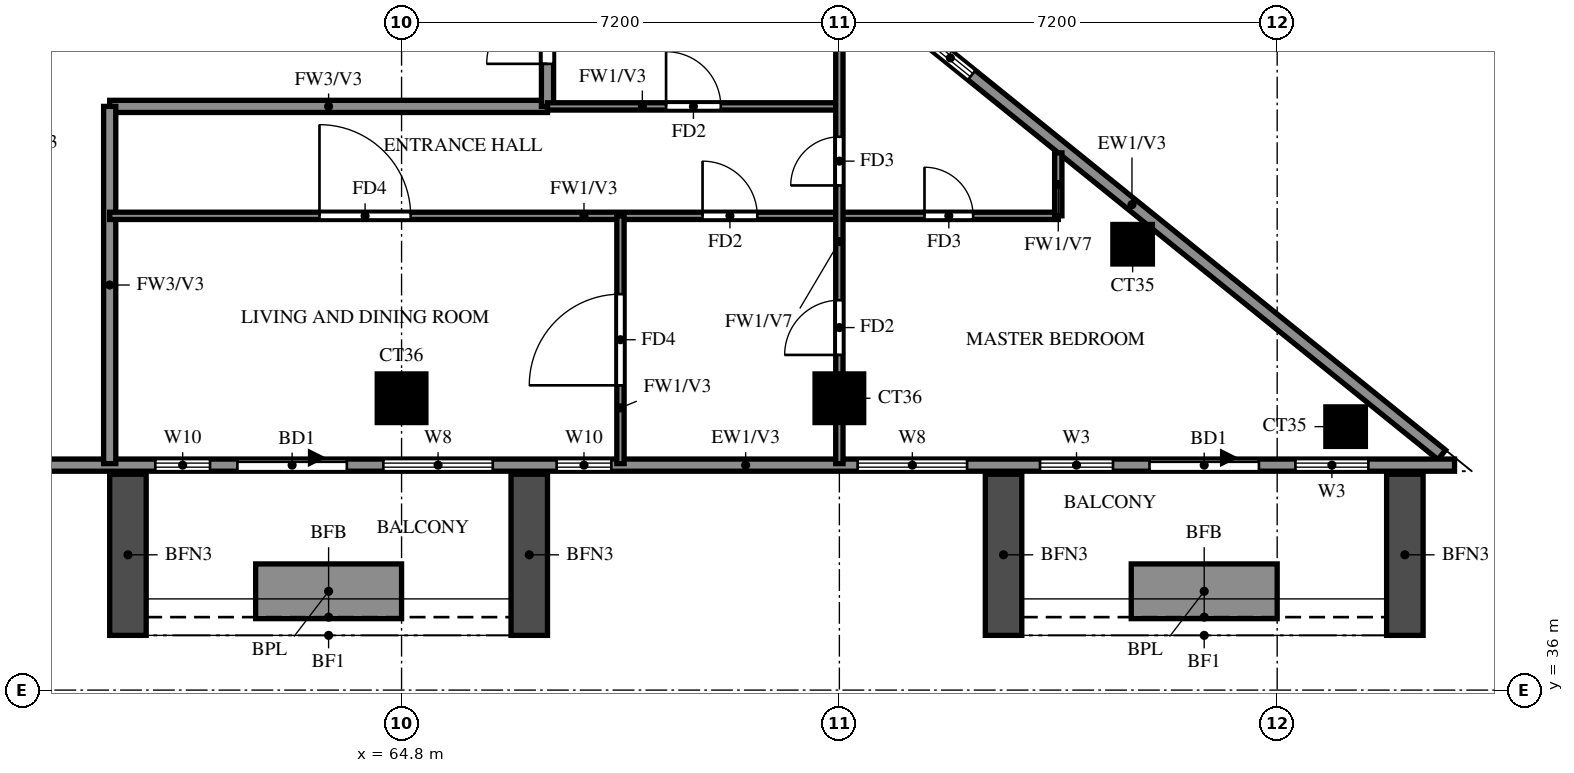
"""IFC4 building model, lengths in metres.
Left out: names, types, materials, properties, quantities, classifications, styles, units other than length and angle.
Written with IfcOpenShell. Run it as: python <this file> out.ifc"""

import sys

from ifc_helpers import new_model, si_unit, direction, frame, frame_2d, origin, origin_2d, place, context, subcontext, project, spatial, rectangle, extrude, source, transform, mapped, element, fill, save


model = new_model("IFC4")
c1 = context("Model", 3, precision=1e-05, world=origin(), true_north=direction((0.0, 1.0)))
c2 = subcontext(c1, "Body", "Model", "MODEL_VIEW")
j1 = project(units=[si_unit("LENGTHUNIT", "METRE"), si_unit("PLANEANGLEUNIT", "RADIAN")], contexts=[c1])
p1 = place(None, origin())
s1 = spatial("IfcSite", under=j1, at=p1, CompositionType="ELEMENT")
p2 = place(p1, origin())
s2 = spatial("IfcBuilding", under=s1, at=p2, CompositionType="ELEMENT")
p3 = place(p2, frame((0.0, 0.0, 246.5)))
s3 = spatial("IfcBuildingStorey", under=s2, at=p3, CompositionType="ELEMENT", Elevation=246.5)
m1 = source(origin(), c2, "Body", "SweptSolid", [
    extrude(rectangle(XDim=0.65, YDim=0.65, at=origin_2d()), origin(), (0.0, 0.0, 1.0), 3.22),
])
p4 = place(p3, frame((80.326, 40.333, 0.0), z_axis=(0.0, 0.0, 1.0), x_axis=(1.0, 0.0, 0.0)))
e1 = element("IfcColumn", 1, at=p4, inside=s3, PredefinedType="COLUMN", context=c2, shape_type="MappedRepresentation", body=[
    mapped(m1, transform((0.0, 0.0, 0.0))),
])
m2 = source(origin(), c2, "Body", "SweptSolid", [
    extrude(rectangle(XDim=0.8, YDim=0.8, at=origin_2d()), origin(), (0.0, 0.0, 1.0), 3.22),
])
for number, where, z_axis, x_axis in (
    (2, (64.8, 40.8, 0.0), (0.0, 0.0, 1.0), (1.0, 0.0, 0.0)),
    (3, (72.0, 40.8, 0.0), (0.0, 0.0, 1.0), (1.0, 0.0, 0.0)),
):
    element("IfcColumn", number, at=place(p3, frame(where, z_axis=z_axis, x_axis=x_axis)), inside=s3, PredefinedType="COLUMN", context=c2, shape_type="MappedRepresentation", body=[
        mapped(m2, transform((0.0, 0.0, 0.0))),
    ])
p5 = place(p3, frame((76.823, 43.333, 0.0), z_axis=(0.0, 0.0, 1.0), x_axis=(1.0, 0.0, 0.0)))
e4 = element("IfcColumn", 4, at=p5, inside=s3, PredefinedType="COLUMN", context=c2, shape_type="MappedRepresentation", body=[
    mapped(m1, transform((0.0, 0.0, 0.0))),
])
p6 = place(p3, frame((81.907, 39.87, 0.0), z_axis=(0.0, 0.0, 1.0), x_axis=(-0.777936274417, 0.62834318087, 0.0)))
e5 = element("IfcWall", 5, at=p6, inside=s3, PredefinedType="SOLIDWALL", context=c2, shape_type="SweptSolid", body=[
    extrude(rectangle(XDim=13.099, YDim=0.2, at=frame_2d((6.549, 0.0))), origin(), (0.0, 0.0, 1.0), 3.22),
])
p7 = place(p6, frame((9.938, 0.0, 1.5)))
e6 = element("IfcOpeningElement", 6, at=p7, cuts=e5, PredefinedType="OPENING", context=c2, shape_type="SweptSolid", body=[
    extrude(rectangle(XDim=0.9, YDim=0.9, at=frame_2d((0.45, 0.45))), frame((0.0, 0.11, 0.0), z_axis=(0.0, -1.0, 0.0), x_axis=(1.0, 0.0, 0.0)), (0.0, 0.0, 1.0), 0.22),
])
p8 = place(p3, frame((58.8, 39.7, 0.0), z_axis=(0.0, 0.0, 1.0), x_axis=(1.0, 0.0, 0.0)))
e7 = element("IfcWall", 7, at=p8, inside=s3, PredefinedType="SOLIDWALL", context=c2, shape_type="SweptSolid", body=[
    extrude(rectangle(XDim=23.317, YDim=0.2, at=frame_2d((11.658, 0.0))), origin(), (0.0, 0.0, 1.0), 3.22),
])
p9 = place(p8, frame((3.3, 0.0, 0.0)))
e8 = element("IfcOpeningElement", 8, at=p9, cuts=e7, PredefinedType="OPENING", context=c2, shape_type="SweptSolid", body=[
    extrude(rectangle(XDim=1.8, YDim=2.4, at=frame_2d((0.9, 1.2))), frame((0.0, 0.11, 0.0), z_axis=(0.0, -1.0, 0.0), x_axis=(1.0, 0.0, 0.0)), (0.0, 0.0, 1.0), 0.22),
])
p10 = place(p8, frame((18.3, 0.0, 0.0)))
e9 = element("IfcOpeningElement", 9, at=p10, cuts=e7, PredefinedType="OPENING", context=c2, shape_type="SweptSolid", body=[
    extrude(rectangle(XDim=1.8, YDim=2.4, at=frame_2d((0.9, 1.2))), frame((0.0, 0.11, 0.0), z_axis=(0.0, -1.0, 0.0), x_axis=(1.0, 0.0, 0.0)), (0.0, 0.0, 1.0), 0.22),
])
p11 = place(p8, frame((1.95, 0.0, 0.6)))
e10 = element("IfcOpeningElement", 10, at=p11, cuts=e7, PredefinedType="OPENING", context=c2, shape_type="SweptSolid", body=[
    extrude(rectangle(XDim=0.9, YDim=2.4, at=frame_2d((0.45, 1.2))), frame((0.0, 0.11, 0.0), z_axis=(0.0, -1.0, 0.0), x_axis=(1.0, 0.0, 0.0)), (0.0, 0.0, 1.0), 0.22),
])
p12 = place(p8, frame((5.7, 0.0, 0.6)))
e11 = element("IfcOpeningElement", 11, at=p12, cuts=e7, PredefinedType="OPENING", context=c2, shape_type="SweptSolid", body=[
    extrude(rectangle(XDim=1.8, YDim=2.4, at=frame_2d((0.9, 1.2))), frame((0.0, 0.11, 0.0), z_axis=(0.0, -1.0, 0.0), x_axis=(1.0, 0.0, 0.0)), (0.0, 0.0, 1.0), 0.22),
])
p13 = place(p8, frame((8.55, 0.0, 0.6)))
e12 = element("IfcOpeningElement", 12, at=p13, cuts=e7, PredefinedType="OPENING", context=c2, shape_type="SweptSolid", body=[
    extrude(rectangle(XDim=0.9, YDim=2.4, at=frame_2d((0.45, 1.2))), frame((0.0, 0.11, 0.0), z_axis=(0.0, -1.0, 0.0), x_axis=(1.0, 0.0, 0.0)), (0.0, 0.0, 1.0), 0.22),
])
p14 = place(p8, frame((13.5, 0.0, 0.6)))
e13 = element("IfcOpeningElement", 13, at=p14, cuts=e7, PredefinedType="OPENING", context=c2, shape_type="SweptSolid", body=[
    extrude(rectangle(XDim=1.8, YDim=2.4, at=frame_2d((0.9, 1.2))), frame((0.0, 0.11, 0.0), z_axis=(0.0, -1.0, 0.0), x_axis=(1.0, 0.0, 0.0)), (0.0, 0.0, 1.0), 0.22),
])
p15 = place(p8, frame((16.5, 0.0, 0.6)))
e14 = element("IfcOpeningElement", 14, at=p15, cuts=e7, PredefinedType="OPENING", context=c2, shape_type="SweptSolid", body=[
    extrude(rectangle(XDim=1.2, YDim=2.4, at=frame_2d((0.6, 1.2))), frame((0.0, 0.11, 0.0), z_axis=(0.0, -1.0, 0.0), x_axis=(1.0, 0.0, 0.0)), (0.0, 0.0, 1.0), 0.22),
])
p16 = place(p8, frame((20.7, 0.0, 0.6)))
e15 = element("IfcOpeningElement", 15, at=p16, cuts=e7, PredefinedType="OPENING", context=c2, shape_type="SweptSolid", body=[
    extrude(rectangle(XDim=1.2, YDim=2.4, at=frame_2d((0.6, 1.2))), frame((0.0, 0.11, 0.0), z_axis=(0.0, -1.0, 0.0), x_axis=(1.0, 0.0, 0.0)), (0.0, 0.0, 1.0), 0.22),
])
for number, where, z_axis, x_axis in (
    (16, (60.3, 39.55, 0.0), (0.0, 0.0, 1.0), (0.0, -1.0, 0.0)),
    (17, (66.9, 39.55, 0.0), (0.0, 0.0, 1.0), (0.0, -1.0, 0.0)),
):
    element("IfcWall", number, at=place(p3, frame(where, z_axis=z_axis, x_axis=x_axis)), inside=s3, PredefinedType="SOLIDWALL", context=c2, shape_type="SweptSolid", body=[
        extrude(rectangle(XDim=2.65, YDim=0.6, at=frame_2d((1.325, 0.0))), origin(), (0.0, 0.0, 1.0), 2.85),
    ])
p17 = place(p3, frame((62.4, 37.625, 0.0), z_axis=(0.0, 0.0, 1.0), x_axis=(1.0, 0.0, 0.0)))
e18 = element("IfcWall", 18, at=p17, inside=s3, PredefinedType="SOLIDWALL", context=c2, shape_type="SweptSolid", body=[
    extrude(rectangle(XDim=2.4, YDim=0.9, at=frame_2d((1.2, 0.0))), origin(), (0.0, 0.0, 1.0), 0.9),
])
for number, where, z_axis, x_axis in (
    (19, (74.7, 39.55, 0.0), (0.0, 0.0, 1.0), (0.0, -1.0, 0.0)),
    (20, (81.3, 39.55, 0.0), (0.0, 0.0, 1.0), (0.0, -1.0, 0.0)),
):
    element("IfcWall", number, at=place(p3, frame(where, z_axis=z_axis, x_axis=x_axis)), inside=s3, PredefinedType="SOLIDWALL", context=c2, shape_type="SweptSolid", body=[
        extrude(rectangle(XDim=2.65, YDim=0.6, at=frame_2d((1.325, 0.0))), origin(), (0.0, 0.0, 1.0), 2.85),
    ])
p18 = place(p3, frame((76.8, 37.625, 0.0), z_axis=(0.0, 0.0, 1.0), x_axis=(1.0, 0.0, 0.0)))
e21 = element("IfcWall", 21, at=p18, inside=s3, PredefinedType="SOLIDWALL", context=c2, shape_type="SweptSolid", body=[
    extrude(rectangle(XDim=2.4, YDim=0.9, at=frame_2d((1.2, 0.0))), origin(), (0.0, 0.0, 1.0), 0.9),
])
p19 = place(p3, frame((60.0, 45.6, 0.0), z_axis=(0.0, 0.0, 1.0), x_axis=(1.0, 0.0, 0.0)))
e22 = element("IfcWall", 22, at=p19, inside=s3, PredefinedType="SOLIDWALL", context=c2, shape_type="SweptSolid", body=[
    extrude(rectangle(XDim=7.2, YDim=0.2, at=frame_2d((3.6, 0.0))), origin(), (0.0, 0.0, 1.0), 3.22),
])
p20 = place(p3, frame((60.0, 39.725, 0.0), z_axis=(0.0, 0.0, 1.0), x_axis=(0.0, 1.0, 0.0)))
e23 = element("IfcWall", 23, at=p20, inside=s3, PredefinedType="SOLIDWALL", context=c2, shape_type="SweptSolid", body=[
    extrude(rectangle(XDim=5.875, YDim=0.2, at=frame_2d((2.938, 0.0))), origin(), (0.0, 0.0, 1.0), 3.22),
])
p21 = place(p3, frame((67.2, 45.6, 0.0), z_axis=(0.0, 0.0, 1.0), x_axis=(0.0, 1.0, 0.0)))
e24 = element("IfcWall", 24, at=p21, inside=s3, PredefinedType="SOLIDWALL", context=c2, shape_type="SweptSolid", body=[
    extrude(rectangle(XDim=8.4, YDim=0.2, at=frame_2d((4.2, 0.0))), origin(), (0.0, 0.0, 1.0), 3.22),
])
p22 = place(p21, frame((6.7, 0.0, 0.0)))
e25 = element("IfcOpeningElement", 25, at=p22, cuts=e24, PredefinedType="OPENING", context=c2, shape_type="SweptSolid", body=[
    extrude(rectangle(XDim=1.0, YDim=2.1, at=frame_2d((0.5, 1.05))), frame((0.0, 0.11, 0.0), z_axis=(0.0, -1.0, 0.0), x_axis=(1.0, 0.0, 0.0)), (0.0, 0.0, 1.0), 0.22),
])
p23 = place(p21, frame((0.7, 0.0, 0.0)))
e26 = element("IfcOpeningElement", 26, at=p23, cuts=e24, PredefinedType="OPENING", context=c2, shape_type="SweptSolid", body=[
    extrude(rectangle(XDim=1.0, YDim=2.1, at=frame_2d((0.5, 1.05))), frame((0.0, 0.11, 0.0), z_axis=(0.0, -1.0, 0.0), x_axis=(1.0, 0.0, 0.0)), (0.0, 0.0, 1.0), 0.22),
])
p24 = place(p3, frame((60.0, 43.8, 0.0), z_axis=(0.0, 0.0, 1.0), x_axis=(1.0, 0.0, 0.0)))
e27 = element("IfcWall", 27, at=p24, inside=s3, PredefinedType="PARTITIONING", context=c2, shape_type="SweptSolid", body=[
    extrude(rectangle(XDim=15.6, YDim=0.12, at=frame_2d((7.8, 0.0))), origin(), (0.0, 0.0, 1.0), 3.22),
])
p25 = place(p24, frame((9.75, 0.0, 0.0)))
e28 = element("IfcOpeningElement", 28, at=p25, cuts=e27, PredefinedType="OPENING", context=c2, shape_type="SweptSolid", body=[
    extrude(rectangle(XDim=0.9, YDim=2.1, at=frame_2d((0.45, 1.05))), frame((0.0, 0.07, 0.0), z_axis=(0.0, -1.0, 0.0), x_axis=(1.0, 0.0, 0.0)), (0.0, 0.0, 1.0), 0.14),
])
p26 = place(p24, frame((3.45, 0.0, 0.0)))
e29 = element("IfcOpeningElement", 29, at=p26, cuts=e27, PredefinedType="OPENING", context=c2, shape_type="SweptSolid", body=[
    extrude(rectangle(XDim=1.5, YDim=2.1, at=frame_2d((0.75, 1.05))), frame((0.0, 0.07, 0.0), z_axis=(0.0, -1.0, 0.0), x_axis=(1.0, 0.0, 0.0)), (0.0, 0.0, 1.0), 0.14),
])
p27 = place(p24, frame((13.4, 0.0, 0.0)))
e30 = element("IfcOpeningElement", 30, at=p27, cuts=e27, PredefinedType="OPENING", context=c2, shape_type="SweptSolid", body=[
    extrude(rectangle(XDim=0.8, YDim=2.1, at=frame_2d((0.4, 1.05))), frame((0.0, 0.07, 0.0), z_axis=(0.0, -1.0, 0.0), x_axis=(1.0, 0.0, 0.0)), (0.0, 0.0, 1.0), 0.14),
])
p28 = place(p3, frame((67.2, 45.6, 0.0), z_axis=(0.0, 0.0, 1.0), x_axis=(1.0, 0.0, 0.0)))
e31 = element("IfcWall", 31, at=p28, inside=s3, PredefinedType="PARTITIONING", context=c2, shape_type="SweptSolid", body=[
    extrude(rectangle(XDim=4.8, YDim=0.12, at=frame_2d((2.4, 0.0))), origin(), (0.0, 0.0, 1.0), 3.22),
])
p29 = place(p28, frame((1.95, 0.0, 0.0)))
e32 = element("IfcOpeningElement", 32, at=p29, cuts=e31, PredefinedType="OPENING", context=c2, shape_type="SweptSolid", body=[
    extrude(rectangle(XDim=0.9, YDim=2.1, at=frame_2d((0.45, 1.05))), frame((0.0, 0.07, 0.0), z_axis=(0.0, -1.0, 0.0), x_axis=(1.0, 0.0, 0.0)), (0.0, 0.0, 1.0), 0.14),
])
p30 = place(p3, frame((68.4, 39.725, 0.0), z_axis=(0.0, 0.0, 1.0), x_axis=(0.0, 1.0, 0.0)))
e33 = element("IfcWall", 33, at=p30, inside=s3, PredefinedType="PARTITIONING", context=c2, shape_type="SweptSolid", body=[
    extrude(rectangle(XDim=4.075, YDim=0.12, at=frame_2d((2.038, 0.0))), origin(), (0.0, 0.0, 1.0), 3.22),
])
p31 = place(p30, frame((1.288, 0.0, 0.0)))
e34 = element("IfcOpeningElement", 34, at=p31, cuts=e33, PredefinedType="OPENING", context=c2, shape_type="SweptSolid", body=[
    extrude(rectangle(XDim=1.5, YDim=2.1, at=frame_2d((0.75, 1.05))), frame((0.0, 0.07, 0.0), z_axis=(0.0, -1.0, 0.0), x_axis=(1.0, 0.0, 0.0)), (0.0, 0.0, 1.0), 0.14),
])
p32 = place(p3, frame((72.0, 39.725, 0.0), z_axis=(0.0, 0.0, 1.0), x_axis=(0.0, 1.0, 0.0)))
e35 = element("IfcWall", 35, at=p32, inside=s3, PredefinedType="PARTITIONING", context=c2, shape_type="SweptSolid", body=[
    extrude(rectangle(XDim=8.114, YDim=0.12, at=frame_2d((4.057, 0.0))), origin(), (0.0, 0.0, 1.0), 2.32),
])
p33 = place(p32, frame((1.788, 0.0, 0.0)))
e36 = element("IfcOpeningElement", 36, at=p33, cuts=e35, PredefinedType="OPENING", context=c2, shape_type="SweptSolid", body=[
    extrude(rectangle(XDim=0.9, YDim=2.1, at=frame_2d((0.45, 1.05))), frame((0.0, 0.07, 0.0), z_axis=(0.0, -1.0, 0.0), x_axis=(1.0, 0.0, 0.0)), (0.0, 0.0, 1.0), 0.14),
])
p34 = place(p32, frame((4.575, 0.0, 0.0)))
e37 = element("IfcOpeningElement", 37, at=p34, cuts=e35, PredefinedType="OPENING", context=c2, shape_type="SweptSolid", body=[
    extrude(rectangle(XDim=0.8, YDim=2.1, at=frame_2d((0.4, 1.05))), frame((0.0, 0.07, 0.0), z_axis=(0.0, -1.0, 0.0), x_axis=(1.0, 0.0, 0.0)), (0.0, 0.0, 1.0), 0.14),
])
p35 = place(p3, frame((75.6, 43.8, 0.0), z_axis=(0.0, 0.0, 1.0), x_axis=(0.0, 1.0, 0.0)))
e38 = element("IfcWall", 38, at=p35, inside=s3, PredefinedType="PARTITIONING", context=c2, shape_type="SweptSolid", body=[
    extrude(rectangle(XDim=1.035, YDim=0.12, at=frame_2d((0.518, 0.0))), origin(), (0.0, 0.0, 1.0), 2.32),
])
p36 = place(p7, origin())
e39 = element("IfcWindow", 39, at=p36, inside=s3, PartitioningType="SINGLE_PANEL", PredefinedType="WINDOW", context=c2, shape_type="SweptSolid", body=[
    extrude(rectangle(XDim=0.9, YDim=0.9, at=frame_2d((0.45, 0.45))), frame((0.0, 0.03, 0.0), z_axis=(0.0, -1.0, 0.0), x_axis=(1.0, 0.0, 0.0)), (0.0, 0.0, 1.0), 0.06),
])
fill(e6, e39)
p37 = place(p9, origin())
e40 = element("IfcDoor", 40, at=p37, inside=s3, OperationType="DOUBLE_DOOR_SLIDING", PredefinedType="DOOR", context=c2, shape_type="SweptSolid", body=[
    extrude(rectangle(XDim=1.8, YDim=2.4, at=frame_2d((0.9, 1.2))), frame((0.0, 0.025, 0.0), z_axis=(0.0, -1.0, 0.0), x_axis=(1.0, 0.0, 0.0)), (0.0, 0.0, 1.0), 0.05),
])
fill(e8, e40)
p38 = place(p10, origin())
e41 = element("IfcDoor", 41, at=p38, inside=s3, OperationType="DOUBLE_DOOR_SLIDING", PredefinedType="DOOR", context=c2, shape_type="SweptSolid", body=[
    extrude(rectangle(XDim=1.8, YDim=2.4, at=frame_2d((0.9, 1.2))), frame((0.0, 0.025, 0.0), z_axis=(0.0, -1.0, 0.0), x_axis=(1.0, 0.0, 0.0)), (0.0, 0.0, 1.0), 0.05),
])
fill(e9, e41)
p39 = place(p11, origin())
e42 = element("IfcWindow", 42, at=p39, inside=s3, PartitioningType="SINGLE_PANEL", PredefinedType="WINDOW", context=c2, shape_type="SweptSolid", body=[
    extrude(rectangle(XDim=0.9, YDim=2.4, at=frame_2d((0.45, 1.2))), frame((0.0, 0.03, 0.0), z_axis=(0.0, -1.0, 0.0), x_axis=(1.0, 0.0, 0.0)), (0.0, 0.0, 1.0), 0.06),
])
fill(e10, e42)
p40 = place(p12, origin())
e43 = element("IfcWindow", 43, at=p40, inside=s3, PartitioningType="DOUBLE_PANEL_VERTICAL", PredefinedType="WINDOW", context=c2, shape_type="SweptSolid", body=[
    extrude(rectangle(XDim=1.8, YDim=2.4, at=frame_2d((0.9, 1.2))), frame((0.0, 0.03, 0.0), z_axis=(0.0, -1.0, 0.0), x_axis=(1.0, 0.0, 0.0)), (0.0, 0.0, 1.0), 0.06),
])
fill(e11, e43)
p41 = place(p13, origin())
e44 = element("IfcWindow", 44, at=p41, inside=s3, PartitioningType="SINGLE_PANEL", PredefinedType="WINDOW", context=c2, shape_type="SweptSolid", body=[
    extrude(rectangle(XDim=0.9, YDim=2.4, at=frame_2d((0.45, 1.2))), frame((0.0, 0.03, 0.0), z_axis=(0.0, -1.0, 0.0), x_axis=(1.0, 0.0, 0.0)), (0.0, 0.0, 1.0), 0.06),
])
fill(e12, e44)
p42 = place(p14, origin())
e45 = element("IfcWindow", 45, at=p42, inside=s3, PartitioningType="DOUBLE_PANEL_VERTICAL", PredefinedType="WINDOW", context=c2, shape_type="SweptSolid", body=[
    extrude(rectangle(XDim=1.8, YDim=2.4, at=frame_2d((0.9, 1.2))), frame((0.0, 0.03, 0.0), z_axis=(0.0, -1.0, 0.0), x_axis=(1.0, 0.0, 0.0)), (0.0, 0.0, 1.0), 0.06),
])
fill(e13, e45)
p43 = place(p15, origin())
e46 = element("IfcWindow", 46, at=p43, inside=s3, PartitioningType="SINGLE_PANEL", PredefinedType="WINDOW", context=c2, shape_type="SweptSolid", body=[
    extrude(rectangle(XDim=1.2, YDim=2.4, at=frame_2d((0.6, 1.2))), frame((0.0, 0.03, 0.0), z_axis=(0.0, -1.0, 0.0), x_axis=(1.0, 0.0, 0.0)), (0.0, 0.0, 1.0), 0.06),
])
fill(e14, e46)
p44 = place(p16, origin())
e47 = element("IfcWindow", 47, at=p44, inside=s3, PartitioningType="SINGLE_PANEL", PredefinedType="WINDOW", context=c2, shape_type="SweptSolid", body=[
    extrude(rectangle(XDim=1.2, YDim=2.4, at=frame_2d((0.6, 1.2))), frame((0.0, 0.03, 0.0), z_axis=(0.0, -1.0, 0.0), x_axis=(1.0, 0.0, 0.0)), (0.0, 0.0, 1.0), 0.06),
])
fill(e15, e47)
p45 = place(p31, origin())
e48 = element("IfcDoor", 48, at=p45, inside=s3, OperationType="SINGLE_SWING_RIGHT", PredefinedType="DOOR", context=c2, shape_type="SweptSolid", body=[
    extrude(rectangle(XDim=1.5, YDim=2.1, at=frame_2d((0.75, 1.05))), frame((0.0, 0.025, 0.0), z_axis=(0.0, -1.0, 0.0), x_axis=(1.0, 0.0, 0.0)), (0.0, 0.0, 1.0), 0.05),
])
fill(e34, e48)
p46 = place(p29, origin())
e49 = element("IfcDoor", 49, at=p46, inside=s3, OperationType="SINGLE_SWING_LEFT", PredefinedType="DOOR", context=c2, shape_type="SweptSolid", body=[
    extrude(rectangle(XDim=0.9, YDim=2.1, at=frame_2d((0.45, 1.05))), frame((0.0, 0.025, 0.0), z_axis=(0.0, -1.0, 0.0), x_axis=(1.0, 0.0, 0.0)), (0.0, 0.0, 1.0), 0.05),
])
fill(e32, e49)
p47 = place(p23, origin())
e50 = element("IfcDoor", 50, at=p47, inside=s3, OperationType="SINGLE_SWING_LEFT", PredefinedType="DOOR", context=c2, shape_type="SweptSolid", body=[
    extrude(rectangle(XDim=1.0, YDim=2.1, at=frame_2d((0.5, 1.05))), frame((0.0, 0.025, 0.0), z_axis=(0.0, -1.0, 0.0), x_axis=(1.0, 0.0, 0.0)), (0.0, 0.0, 1.0), 0.05),
])
fill(e26, e50)
p48 = place(p25, origin())
e51 = element("IfcDoor", 51, at=p48, inside=s3, OperationType="SINGLE_SWING_RIGHT", PredefinedType="DOOR", context=c2, shape_type="SweptSolid", body=[
    extrude(rectangle(XDim=0.9, YDim=2.1, at=frame_2d((0.45, 1.05))), frame((0.0, 0.025, 0.0), z_axis=(0.0, -1.0, 0.0), x_axis=(1.0, 0.0, 0.0)), (0.0, 0.0, 1.0), 0.05),
])
fill(e28, e51)
p49 = place(p26, origin())
e52 = element("IfcDoor", 52, at=p49, inside=s3, OperationType="SINGLE_SWING_LEFT", PredefinedType="DOOR", context=c2, shape_type="SweptSolid", body=[
    extrude(rectangle(XDim=1.5, YDim=2.1, at=frame_2d((0.75, 1.05))), frame((0.0, 0.025, 0.0), z_axis=(0.0, -1.0, 0.0), x_axis=(1.0, 0.0, 0.0)), (0.0, 0.0, 1.0), 0.05),
])
fill(e29, e52)
p50 = place(p33, origin())
e53 = element("IfcDoor", 53, at=p50, inside=s3, OperationType="SINGLE_SWING_RIGHT", PredefinedType="DOOR", context=c2, shape_type="SweptSolid", body=[
    extrude(rectangle(XDim=0.9, YDim=2.1, at=frame_2d((0.45, 1.05))), frame((0.0, 0.025, 0.0), z_axis=(0.0, -1.0, 0.0), x_axis=(1.0, 0.0, 0.0)), (0.0, 0.0, 1.0), 0.05),
])
fill(e36, e53)
p51 = place(p34, origin())
e54 = element("IfcDoor", 54, at=p51, inside=s3, OperationType="SINGLE_SWING_RIGHT", PredefinedType="DOOR", context=c2, shape_type="SweptSolid", body=[
    extrude(rectangle(XDim=0.8, YDim=2.1, at=frame_2d((0.4, 1.05))), frame((0.0, 0.025, 0.0), z_axis=(0.0, -1.0, 0.0), x_axis=(1.0, 0.0, 0.0)), (0.0, 0.0, 1.0), 0.05),
])
fill(e37, e54)
p52 = place(p27, origin())
e55 = element("IfcDoor", 55, at=p52, inside=s3, OperationType="SINGLE_SWING_LEFT", PredefinedType="DOOR", context=c2, shape_type="SweptSolid", body=[
    extrude(rectangle(XDim=0.8, YDim=2.1, at=frame_2d((0.4, 1.05))), frame((0.0, 0.025, 0.0), z_axis=(0.0, -1.0, 0.0), x_axis=(1.0, 0.0, 0.0)), (0.0, 0.0, 1.0), 0.05),
])
fill(e30, e55)
save(model, sys.argv[1])
